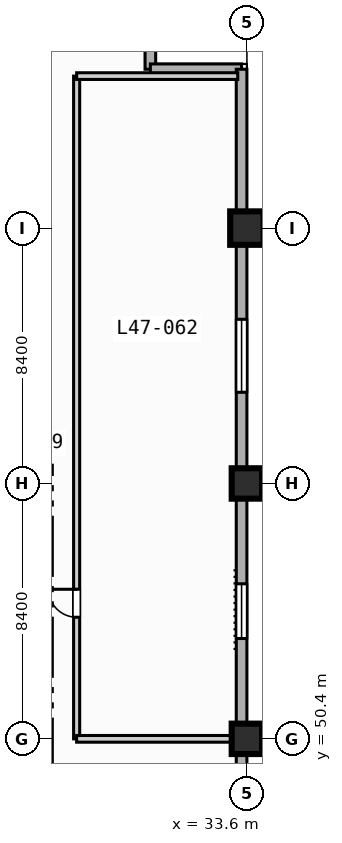
"""IFC4 building model, lengths in metres.
Left out: names, types, materials, properties, quantities, classifications, styles, units other than length and angle.
Written with IfcOpenShell. Run it as: python <this file> out.ifc"""

import sys

from ifc_helpers import new_model, si_unit, direction, frame, frame_2d, origin, origin_2d, place, context, subcontext, project, spatial, rectangle, extrude, element, fill, save


model = new_model("IFC4")
c1 = context("Model", 3, precision=1e-05, world=origin(), true_north=direction((0.0, 1.0)))
c2 = subcontext(c1, "Body", "Model", "MODEL_VIEW")
j1 = project(units=[si_unit("LENGTHUNIT", "METRE"), si_unit("PLANEANGLEUNIT", "RADIAN")], contexts=[c1])
p1 = place(None, origin())
s1 = spatial("IfcSite", under=j1, at=p1, CompositionType="ELEMENT")
p2 = place(p1, origin())
s2 = spatial("IfcBuilding", under=s1, at=p2, CompositionType="ELEMENT")
p3 = place(p2, frame((0.0, 0.0, 193.9)))
s3 = spatial("IfcBuildingStorey", under=s2, at=p3, CompositionType="ELEMENT", Elevation=193.9)
for number, where, z_axis, x_axis in (
    (1, (33.6, 50.4, 0.0), (0.0, 0.0, 1.0), (1.0, 0.0, 0.0)),
    (2, (33.6, 58.8, 0.0), (0.0, 0.0, 1.0), (1.0, 0.0, 0.0)),
):
    element("IfcColumn", number, at=place(p3, frame(where, z_axis=z_axis, x_axis=x_axis)), inside=s3, PredefinedType="COLUMN", context=c2, shape_type="SweptSolid", body=[
        extrude(rectangle(XDim=1.0, YDim=1.0, at=origin_2d()), origin(), (0.0, 0.0, 1.0), 3.7),
    ])
p4 = place(p3, frame((33.6, 67.2, 0.0), z_axis=(0.0, 0.0, 1.0), x_axis=(1.0, 0.0, 0.0)))
e3 = element("IfcColumn", 3, at=p4, inside=s3, PredefinedType="COLUMN", context=c2, shape_type="SweptSolid", body=[
    extrude(rectangle(XDim=1.1, YDim=1.1, at=origin_2d()), origin(), (0.0, 0.0, 1.0), 3.7),
])
for number, where, z_axis, x_axis in (
    (4, (30.425, 75.425, 0.0), (0.0, 0.0, 1.0), (0.0, -1.0, 0.0)),
    (5, (30.425, 72.425, 0.0), (0.0, 0.0, 1.0), (1.0, 0.0, 0.0)),
):
    element("IfcWall", number, at=place(p3, frame(where, z_axis=z_axis, x_axis=x_axis)), inside=s3, PredefinedType="STANDARD", context=c2, shape_type="SweptSolid", body=[
        extrude(rectangle(XDim=3.0, YDim=0.35, at=frame_2d((1.5, 0.0))), origin(), (0.0, 0.0, 1.0), 3.47),
    ])
p5 = place(p3, frame((33.425, 72.425, 0.0), z_axis=(0.0, 0.0, 1.0), x_axis=(0.0, -1.0, 0.0)))
e6 = element("IfcWall", 6, at=p5, inside=s3, PredefinedType="STANDARD", context=c2, shape_type="SweptSolid", body=[
    extrude(rectangle(XDim=39.0, YDim=0.35, at=frame_2d((19.5, 0.0))), origin(), (0.0, 0.0, 1.0), 3.47),
])
p6 = place(p5, frame((33.725, 0.0, 0.85)))
e7 = element("IfcOpeningElement", 7, at=p6, cuts=e6, PredefinedType="OPENING", context=c2, shape_type="SweptSolid", body=[
    extrude(rectangle(XDim=1.8, YDim=1.8, at=frame_2d((0.9, 0.9))), frame((0.0, 0.185, 0.0), z_axis=(0.0, -1.0, 0.0), x_axis=(1.0, 0.0, 0.0)), (0.0, 0.0, 1.0), 0.37),
])
p7 = place(p5, frame((16.925, 0.0, 0.85)))
e8 = element("IfcOpeningElement", 8, at=p7, cuts=e6, PredefinedType="OPENING", context=c2, shape_type="SweptSolid", body=[
    extrude(rectangle(XDim=1.8, YDim=1.8, at=frame_2d((0.9, 0.9))), frame((0.0, 0.185, 0.0), z_axis=(0.0, -1.0, 0.0), x_axis=(1.0, 0.0, 0.0)), (0.0, 0.0, 1.0), 0.37),
])
p8 = place(p5, frame((8.225, 0.0, 0.85)))
e9 = element("IfcOpeningElement", 9, at=p8, cuts=e6, PredefinedType="OPENING", context=c2, shape_type="SweptSolid", body=[
    extrude(rectangle(XDim=2.4, YDim=1.95, at=frame_2d((1.2, 0.975))), frame((0.0, 0.185, 0.0), z_axis=(0.0, -1.0, 0.0), x_axis=(1.0, 0.0, 0.0)), (0.0, 0.0, 1.0), 0.37),
])
p9 = place(p3, frame((28.0, 50.4, 0.0), z_axis=(0.0, 0.0, 1.0), x_axis=(0.0, 1.0, 0.0)))
e10 = element("IfcWall", 10, at=p9, inside=s3, PredefinedType="PARTITIONING", context=c2, shape_type="SweptSolid", body=[
    extrude(rectangle(XDim=21.8, YDim=0.2, at=frame_2d((10.9, 0.0))), origin(), (0.0, 0.0, 1.0), 3.47),
])
p10 = place(p9, frame((4.0, 0.0, 0.0)))
e11 = element("IfcOpeningElement", 11, at=p10, cuts=e10, PredefinedType="OPENING", context=c2, shape_type="SweptSolid", body=[
    extrude(rectangle(XDim=0.92, YDim=2.1, at=frame_2d((0.46, 1.05))), frame((0.0, 0.11, 0.0), z_axis=(0.0, -1.0, 0.0), x_axis=(1.0, 0.0, 0.0)), (0.0, 0.0, 1.0), 0.22),
])
p11 = place(p3, frame((28.0, 50.4, 0.0), z_axis=(0.0, 0.0, 1.0), x_axis=(1.0, 0.0, 0.0)))
e12 = element("IfcWall", 12, at=p11, inside=s3, PredefinedType="PARTITIONING", context=c2, shape_type="SweptSolid", body=[
    extrude(rectangle(XDim=5.3, YDim=0.22, at=frame_2d((2.65, 0.0))), origin(), (0.0, 0.0, 1.0), 2.82),
])
p12 = place(p3, frame((28.0, 72.2, 0.0), z_axis=(0.0, 0.0, 1.0), x_axis=(1.0, 0.0, 0.0)))
e13 = element("IfcWall", 13, at=p12, inside=s3, PredefinedType="PARTITIONING", context=c2, shape_type="SweptSolid", body=[
    extrude(rectangle(XDim=5.3, YDim=0.22, at=frame_2d((2.65, 0.0))), origin(), (0.0, 0.0, 1.0), 3.47),
])
p13 = place(p7, origin())
e14 = element("IfcWindow", 14, at=p13, inside=s3, PartitioningType="SINGLE_PANEL", PredefinedType="WINDOW", context=c2, shape_type="SweptSolid", body=[
    extrude(rectangle(XDim=1.8, YDim=1.8, at=frame_2d((0.9, 0.9))), frame((0.0, 0.03, 0.0), z_axis=(0.0, -1.0, 0.0), x_axis=(1.0, 0.0, 0.0)), (0.0, 0.0, 1.0), 0.06),
])
fill(e8, e14)
p14 = place(p8, origin())
e15 = element("IfcWindow", 15, at=p14, inside=s3, PartitioningType="SINGLE_PANEL", PredefinedType="WINDOW", context=c2, shape_type="SweptSolid", body=[
    extrude(rectangle(XDim=2.4, YDim=1.95, at=frame_2d((1.2, 0.975))), frame((0.0, 0.03, 0.0), z_axis=(0.0, -1.0, 0.0), x_axis=(1.0, 0.0, 0.0)), (0.0, 0.0, 1.0), 0.06),
])
fill(e9, e15)
p15 = place(p10, origin())
e16 = element("IfcDoor", 16, at=p15, inside=s3, OperationType="SINGLE_SWING_RIGHT", PredefinedType="DOOR", context=c2, shape_type="SweptSolid", body=[
    extrude(rectangle(XDim=0.92, YDim=2.1, at=frame_2d((0.46, 1.05))), frame((0.0, 0.025, 0.0), z_axis=(0.0, -1.0, 0.0), x_axis=(1.0, 0.0, 0.0)), (0.0, 0.0, 1.0), 0.05),
])
fill(e11, e16)
save(model, sys.argv[1])
